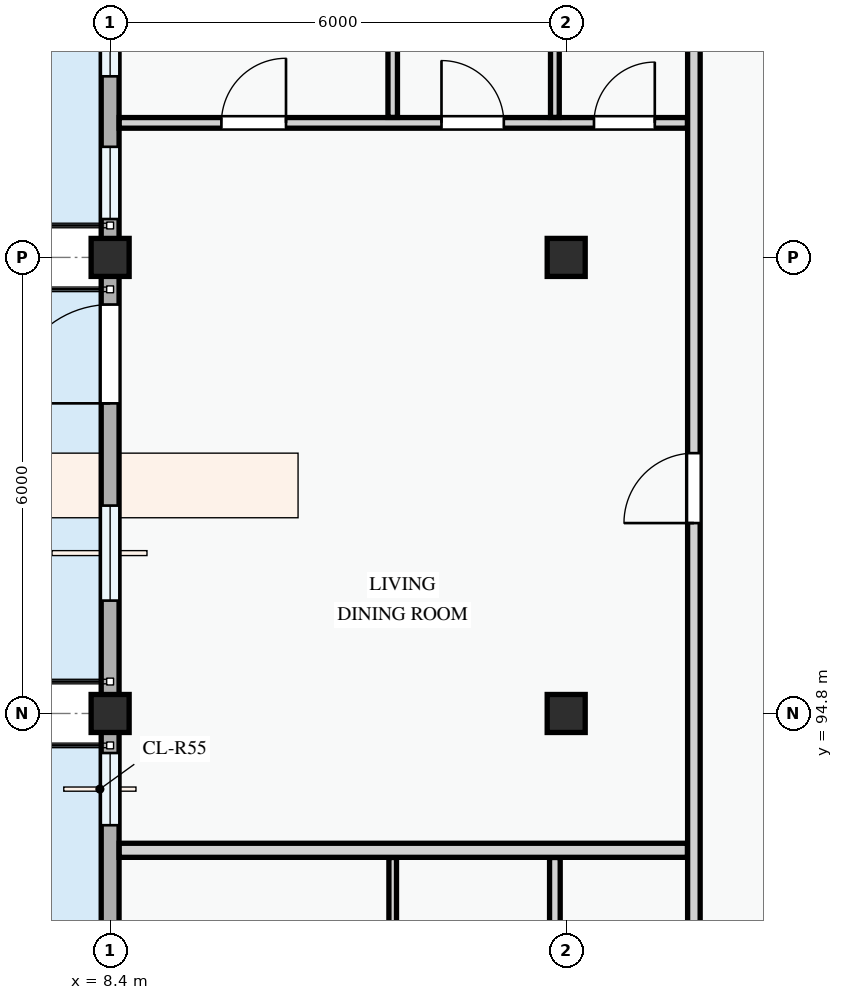
"""IFC4 building model, lengths in metres.
Left out: names, types, materials, properties, quantities, classifications, styles, units other than length and angle.
Written with IfcOpenShell. Run it as: python <this file> out.ifc"""

import sys

from ifc_helpers import new_model, si_unit, direction, frame, frame_2d, origin, origin_2d, place, context, subcontext, project, spatial, rectangle, extrude, element, fill, save


model = new_model("IFC4")
c1 = context("Model", 3, precision=1e-05, world=origin(), true_north=direction((0.0, 1.0)))
c2 = subcontext(c1, "Body", "Model", "MODEL_VIEW")
j1 = project(units=[si_unit("LENGTHUNIT", "METRE"), si_unit("PLANEANGLEUNIT", "RADIAN")], contexts=[c1])
p1 = place(None, origin())
s1 = spatial("IfcSite", under=j1, at=p1, CompositionType="ELEMENT")
p2 = place(p1, origin())
s2 = spatial("IfcBuilding", under=s1, at=p2, CompositionType="ELEMENT")
p3 = place(p2, frame((0.0, 0.0, 44.4)))
s3 = spatial("IfcBuildingStorey", under=s2, at=p3, CompositionType="ELEMENT", Elevation=44.4)
for number, where, z_axis, x_axis in (
    (1, (8.4, 94.8, 0.0), (0.0, 0.0, 1.0), (1.0, 0.0, 0.0)),
    (2, (8.4, 100.8, 0.0), (0.0, 0.0, 1.0), (1.0, 0.0, 0.0)),
    (3, (14.4, 94.8, 0.0), (0.0, 0.0, 1.0), (1.0, 0.0, 0.0)),
    (4, (14.4, 100.8, 0.0), (0.0, 0.0, 1.0), (1.0, 0.0, 0.0)),
):
    element("IfcColumn", number, at=place(p3, frame(where, z_axis=z_axis, x_axis=x_axis)), inside=s3, PredefinedType="COLUMN", context=c2, shape_type="SweptSolid", body=[
        extrude(rectangle(XDim=0.5, YDim=0.5, at=origin_2d()), origin(), (0.0, 0.0, 1.0), 3.3),
    ])
p4 = place(p3, frame((8.4, 109.2, 0.0), z_axis=(0.0, 0.0, 1.0), x_axis=(0.0, -1.0, 0.0)))
e5 = element("IfcWall", 5, at=p4, inside=s3, PredefinedType="STANDARD", context=c2, shape_type="SweptSolid", body=[
    extrude(rectangle(XDim=8.4, YDim=0.235, at=frame_2d((4.2, 0.0))), origin(), (0.0, 0.0, 1.0), 2.425),
])
p5 = place(p4, frame((0.62, 0.0, 0.0)))
e6 = element("IfcOpeningElement", 6, at=p5, cuts=e5, PredefinedType="OPENING", context=c2, shape_type="SweptSolid", body=[
    extrude(rectangle(XDim=1.25, YDim=2.2, at=frame_2d((0.625, 1.1))), frame((0.0, 0.127, 0.0), z_axis=(0.0, -1.0, 0.0), x_axis=(1.0, 0.0, 0.0)), (0.0, 0.0, 1.0), 0.255),
])
p6 = place(p4, frame((2.292, 0.0, 0.78)))
e7 = element("IfcOpeningElement", 7, at=p6, cuts=e5, PredefinedType="OPENING", context=c2, shape_type="SweptSolid", body=[
    extrude(rectangle(XDim=1.68, YDim=1.46, at=frame_2d((0.84, 0.73))), frame((0.0, 0.127, 0.0), z_axis=(0.0, -1.0, 0.0), x_axis=(1.0, 0.0, 0.0)), (0.0, 0.0, 1.0), 0.255),
])
p7 = place(p4, frame((4.817, 0.0, 0.78)))
e8 = element("IfcOpeningElement", 8, at=p7, cuts=e5, PredefinedType="OPENING", context=c2, shape_type="SweptSolid", body=[
    extrude(rectangle(XDim=1.2, YDim=1.35, at=frame_2d((0.6, 0.675))), frame((0.0, 0.127, 0.0), z_axis=(0.0, -1.0, 0.0), x_axis=(1.0, 0.0, 0.0)), (0.0, 0.0, 1.0), 0.255),
])
p8 = place(p4, frame((6.945, 0.0, 0.78)))
e9 = element("IfcOpeningElement", 9, at=p8, cuts=e5, PredefinedType="OPENING", context=c2, shape_type="SweptSolid", body=[
    extrude(rectangle(XDim=0.95, YDim=1.15, at=frame_2d((0.475, 0.575))), frame((0.0, 0.127, 0.0), z_axis=(0.0, -1.0, 0.0), x_axis=(1.0, 0.0, 0.0)), (0.0, 0.0, 1.0), 0.255),
])
p9 = place(p3, frame((8.4, 100.8, 0.0), z_axis=(0.0, 0.0, 1.0), x_axis=(0.0, -1.0, 0.0)))
e10 = element("IfcWall", 10, at=p9, inside=s3, PredefinedType="STANDARD", context=c2, shape_type="SweptSolid", body=[
    extrude(rectangle(XDim=6.0, YDim=0.235, at=frame_2d((3.0, 0.0))), origin(), (0.0, 0.0, 1.0), 2.575),
])
p10 = place(p9, frame((0.62, 0.0, 0.0)))
e11 = element("IfcOpeningElement", 11, at=p10, cuts=e10, PredefinedType="OPENING", context=c2, shape_type="SweptSolid", body=[
    extrude(rectangle(XDim=1.3, YDim=2.15, at=frame_2d((0.65, 1.075))), frame((0.0, 0.127, 0.0), z_axis=(0.0, -1.0, 0.0), x_axis=(1.0, 0.0, 0.0)), (0.0, 0.0, 1.0), 0.255),
])
p11 = place(p9, frame((3.265, 0.0, 0.78)))
e12 = element("IfcOpeningElement", 12, at=p11, cuts=e10, PredefinedType="OPENING", context=c2, shape_type="SweptSolid", body=[
    extrude(rectangle(XDim=1.25, YDim=1.45, at=frame_2d((0.625, 0.725))), frame((0.0, 0.127, 0.0), z_axis=(0.0, -1.0, 0.0), x_axis=(1.0, 0.0, 0.0)), (0.0, 0.0, 1.0), 0.255),
])
p12 = place(p3, frame((8.4, 94.8, 0.0), z_axis=(0.0, 0.0, 1.0), x_axis=(0.0, -1.0, 0.0)))
e13 = element("IfcWall", 13, at=p12, inside=s3, PredefinedType="STANDARD", context=c2, shape_type="SweptSolid", body=[
    extrude(rectangle(XDim=8.4, YDim=0.235, at=frame_2d((4.2, 0.0))), origin(), (0.0, 0.0, 1.0), 2.425),
])
p13 = place(p12, frame((2.735, 0.0, 0.0)))
e14 = element("IfcOpeningElement", 14, at=p13, cuts=e13, PredefinedType="OPENING", context=c2, shape_type="SweptSolid", body=[
    extrude(rectangle(XDim=1.4, YDim=2.2, at=frame_2d((0.7, 1.1))), frame((0.0, 0.127, 0.0), z_axis=(0.0, -1.0, 0.0), x_axis=(1.0, 0.0, 0.0)), (0.0, 0.0, 1.0), 0.255),
])
p14 = place(p12, frame((0.52, 0.0, 0.78)))
e15 = element("IfcOpeningElement", 15, at=p14, cuts=e13, PredefinedType="OPENING", context=c2, shape_type="SweptSolid", body=[
    extrude(rectangle(XDim=0.95, YDim=1.15, at=frame_2d((0.475, 0.575))), frame((0.0, 0.127, 0.0), z_axis=(0.0, -1.0, 0.0), x_axis=(1.0, 0.0, 0.0)), (0.0, 0.0, 1.0), 0.255),
])
p15 = place(p12, frame((5.62, 0.0, 0.78)))
e16 = element("IfcOpeningElement", 16, at=p15, cuts=e13, PredefinedType="OPENING", context=c2, shape_type="SweptSolid", body=[
    extrude(rectangle(XDim=2.04, YDim=1.46, at=frame_2d((1.02, 0.73))), frame((0.0, 0.127, 0.0), z_axis=(0.0, -1.0, 0.0), x_axis=(1.0, 0.0, 0.0)), (0.0, 0.0, 1.0), 0.255),
])
p16 = place(p3, frame((12.118, 89.79, 0.0), z_axis=(0.0, 0.0, 1.0), x_axis=(0.0, 1.0, 0.0)))
e17 = element("IfcWall", 17, at=p16, inside=s3, PredefinedType="PARTITIONING", context=c2, shape_type="SweptSolid", body=[
    extrude(rectangle(XDim=3.116, YDim=0.1, at=frame_2d((1.558, 0.0))), origin(), (0.0, 0.0, 1.0), 3.0),
])
p17 = place(p3, frame((14.251, 89.79, 0.0), z_axis=(0.0, 0.0, 1.0), x_axis=(0.0, 1.0, 0.0)))
e18 = element("IfcWall", 18, at=p17, inside=s3, PredefinedType="PARTITIONING", context=c2, shape_type="SweptSolid", body=[
    extrude(rectangle(XDim=3.116, YDim=0.14, at=frame_2d((1.558, 0.0))), origin(), (0.0, 0.0, 1.0), 2.425),
])
p18 = place(p3, frame((8.52, 102.57, 0.0), z_axis=(0.0, 0.0, 1.0), x_axis=(1.0, 0.0, 0.0)))
e19 = element("IfcWall", 19, at=p18, inside=s3, PredefinedType="PARTITIONING", context=c2, shape_type="SweptSolid", body=[
    extrude(rectangle(XDim=7.476, YDim=0.14, at=frame_2d((3.738, 0.0))), origin(), (0.0, 0.0, 1.0), 3.0),
])
p19 = place(p18, frame((1.344, 0.0, 0.0)))
e20 = element("IfcOpeningElement", 20, at=p19, cuts=e19, PredefinedType="OPENING", context=c2, shape_type="SweptSolid", body=[
    extrude(rectangle(XDim=0.85, YDim=2.1, at=frame_2d((0.425, 1.05))), frame((0.0, 0.08, 0.0), z_axis=(0.0, -1.0, 0.0), x_axis=(1.0, 0.0, 0.0)), (0.0, 0.0, 1.0), 0.16),
])
p20 = place(p18, frame((4.24, 0.0, 0.0)))
e21 = element("IfcOpeningElement", 21, at=p20, cuts=e19, PredefinedType="OPENING", context=c2, shape_type="SweptSolid", body=[
    extrude(rectangle(XDim=0.82, YDim=2.08, at=frame_2d((0.41, 1.04))), frame((0.0, 0.08, 0.0), z_axis=(0.0, -1.0, 0.0), x_axis=(1.0, 0.0, 0.0)), (0.0, 0.0, 1.0), 0.16),
])
p21 = place(p18, frame((6.246, 0.0, 0.0)))
e22 = element("IfcOpeningElement", 22, at=p21, cuts=e19, PredefinedType="OPENING", context=c2, shape_type="SweptSolid", body=[
    extrude(rectangle(XDim=0.8, YDim=2.1, at=frame_2d((0.4, 1.05))), frame((0.0, 0.08, 0.0), z_axis=(0.0, -1.0, 0.0), x_axis=(1.0, 0.0, 0.0)), (0.0, 0.0, 1.0), 0.16),
])
p22 = place(p3, frame((12.118, 102.642, 0.0), z_axis=(0.0, 0.0, 1.0), x_axis=(0.0, 1.0, 0.0)))
e23 = element("IfcWall", 23, at=p22, inside=s3, PredefinedType="PARTITIONING", context=c2, shape_type="SweptSolid", body=[
    extrude(rectangle(XDim=6.586, YDim=0.125, at=frame_2d((3.293, 0.0))), origin(), (0.0, 0.0, 1.0), 3.0),
])
p23 = place(p3, frame((14.251, 102.642, 0.0), z_axis=(0.0, 0.0, 1.0), x_axis=(0.0, 1.0, 0.0)))
e24 = element("IfcWall", 24, at=p23, inside=s3, PredefinedType="PARTITIONING", context=c2, shape_type="SweptSolid", body=[
    extrude(rectangle(XDim=6.586, YDim=0.115, at=frame_2d((3.293, 0.0))), origin(), (0.0, 0.0, 1.0), 2.425),
])
p24 = place(p3, frame((8.52, 93.0, 0.0), z_axis=(0.0, 0.0, 1.0), x_axis=(1.0, 0.0, 0.0)))
e25 = element("IfcWall", 25, at=p24, inside=s3, PredefinedType="PARTITIONING", context=c2, shape_type="SweptSolid", body=[
    extrude(rectangle(XDim=7.476, YDim=0.185, at=frame_2d((3.738, 0.0))), origin(), (0.0, 0.0, 1.0), 3.0),
])
p25 = place(p3, frame((16.08, 86.46, 0.0), z_axis=(0.0, 0.0, 1.0), x_axis=(0.0, 1.0, 0.0)))
e26 = element("IfcWall", 26, at=p25, inside=s3, PredefinedType="PARTITIONING", context=c2, shape_type="SweptSolid", body=[
    extrude(rectangle(XDim=22.88, YDim=0.165, at=frame_2d((11.44, 0.0))), origin(), (0.0, 0.0, 1.0), 3.0),
])
p26 = place(p25, frame((2.06, 0.0, 0.0)))
e27 = element("IfcOpeningElement", 27, at=p26, cuts=e26, PredefinedType="OPENING", context=c2, shape_type="SweptSolid", body=[
    extrude(rectangle(XDim=0.96, YDim=2.12, at=frame_2d((0.48, 1.06))), frame((0.0, 0.093, 0.0), z_axis=(0.0, -1.0, 0.0), x_axis=(1.0, 0.0, 0.0)), (0.0, 0.0, 1.0), 0.185),
])
p27 = place(p25, frame((10.845, 0.0, 0.0)))
e28 = element("IfcOpeningElement", 28, at=p27, cuts=e26, PredefinedType="OPENING", context=c2, shape_type="SweptSolid", body=[
    extrude(rectangle(XDim=0.92, YDim=2.1, at=frame_2d((0.46, 1.05))), frame((0.0, 0.093, 0.0), z_axis=(0.0, -1.0, 0.0), x_axis=(1.0, 0.0, 0.0)), (0.0, 0.0, 1.0), 0.185),
])
p28 = place(p7, origin())
e29 = element("IfcWindow", 29, at=p28, inside=s3, PartitioningType="SINGLE_PANEL", PredefinedType="WINDOW", context=c2, shape_type="SweptSolid", body=[
    extrude(rectangle(XDim=1.2, YDim=1.35, at=frame_2d((0.6, 0.675))), frame((0.0, 0.03, 0.0), z_axis=(0.0, -1.0, 0.0), x_axis=(1.0, 0.0, 0.0)), (0.0, 0.0, 1.0), 0.06),
])
fill(e8, e29)
p29 = place(p8, origin())
e30 = element("IfcWindow", 30, at=p29, inside=s3, PartitioningType="SINGLE_PANEL", PredefinedType="WINDOW", context=c2, shape_type="SweptSolid", body=[
    extrude(rectangle(XDim=0.95, YDim=1.15, at=frame_2d((0.475, 0.575))), frame((0.0, 0.03, 0.0), z_axis=(0.0, -1.0, 0.0), x_axis=(1.0, 0.0, 0.0)), (0.0, 0.0, 1.0), 0.06),
])
fill(e9, e30)
p30 = place(p10, frame((1.3, 0.0, 0.0), z_axis=(0.0, 0.0, 1.0), x_axis=(-1.0, 0.0, 0.0)))
e31 = element("IfcDoor", 31, at=p30, inside=s3, OperationType="SINGLE_SWING_LEFT", PredefinedType="DOOR", context=c2, shape_type="SweptSolid", body=[
    extrude(rectangle(XDim=1.3, YDim=2.15, at=frame_2d((0.65, 1.075))), frame((0.0, 0.025, 0.0), z_axis=(0.0, -1.0, 0.0), x_axis=(1.0, 0.0, 0.0)), (0.0, 0.0, 1.0), 0.05),
])
fill(e11, e31)
p31 = place(p11, origin())
e32 = element("IfcWindow", 32, at=p31, inside=s3, PartitioningType="SINGLE_PANEL", PredefinedType="WINDOW", context=c2, shape_type="SweptSolid", body=[
    extrude(rectangle(XDim=1.25, YDim=1.45, at=frame_2d((0.625, 0.725))), frame((0.0, 0.03, 0.0), z_axis=(0.0, -1.0, 0.0), x_axis=(1.0, 0.0, 0.0)), (0.0, 0.0, 1.0), 0.06),
])
fill(e12, e32)
p32 = place(p14, origin())
e33 = element("IfcWindow", 33, at=p32, inside=s3, PartitioningType="SINGLE_PANEL", PredefinedType="WINDOW", context=c2, shape_type="SweptSolid", body=[
    extrude(rectangle(XDim=0.95, YDim=1.15, at=frame_2d((0.475, 0.575))), frame((0.0, 0.03, 0.0), z_axis=(0.0, -1.0, 0.0), x_axis=(1.0, 0.0, 0.0)), (0.0, 0.0, 1.0), 0.06),
])
fill(e15, e33)
p33 = place(p19, origin())
e34 = element("IfcDoor", 34, at=p33, inside=s3, OperationType="SINGLE_SWING_RIGHT", PredefinedType="DOOR", context=c2, shape_type="SweptSolid", body=[
    extrude(rectangle(XDim=0.85, YDim=2.1, at=frame_2d((0.425, 1.05))), frame((0.0, 0.025, 0.0), z_axis=(0.0, -1.0, 0.0), x_axis=(1.0, 0.0, 0.0)), (0.0, 0.0, 1.0), 0.05),
])
fill(e20, e34)
p34 = place(p20, origin())
e35 = element("IfcDoor", 35, at=p34, inside=s3, OperationType="SINGLE_SWING_LEFT", PredefinedType="DOOR", context=c2, shape_type="SweptSolid", body=[
    extrude(rectangle(XDim=0.82, YDim=2.08, at=frame_2d((0.41, 1.04))), frame((0.0, 0.025, 0.0), z_axis=(0.0, -1.0, 0.0), x_axis=(1.0, 0.0, 0.0)), (0.0, 0.0, 1.0), 0.05),
])
fill(e21, e35)
p35 = place(p21, origin())
e36 = element("IfcDoor", 36, at=p35, inside=s3, OperationType="SINGLE_SWING_RIGHT", PredefinedType="DOOR", context=c2, shape_type="SweptSolid", body=[
    extrude(rectangle(XDim=0.8, YDim=2.1, at=frame_2d((0.4, 1.05))), frame((0.0, 0.025, 0.0), z_axis=(0.0, -1.0, 0.0), x_axis=(1.0, 0.0, 0.0)), (0.0, 0.0, 1.0), 0.05),
])
fill(e22, e36)
p36 = place(p27, origin())
e37 = element("IfcDoor", 37, at=p36, inside=s3, OperationType="SINGLE_SWING_LEFT", PredefinedType="DOOR", context=c2, shape_type="SweptSolid", body=[
    extrude(rectangle(XDim=0.92, YDim=2.1, at=frame_2d((0.46, 1.05))), frame((0.0, 0.025, 0.0), z_axis=(0.0, -1.0, 0.0), x_axis=(1.0, 0.0, 0.0)), (0.0, 0.0, 1.0), 0.05),
])
fill(e28, e37)
save(model, sys.argv[1])
